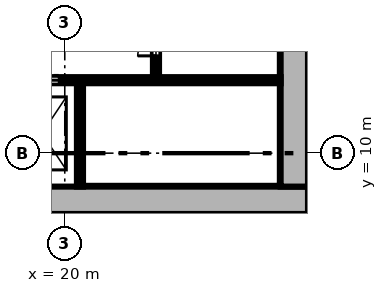
"""IFC4 building model, lengths in metres.
Left out: names, types, materials, properties, quantities, classifications, styles, units other than length and angle.
Written with IfcOpenShell. Run it as: python <this file> out.ifc"""

import sys

from ifc_helpers import new_model, si_unit, direction, frame, frame_2d, origin, place, context, subcontext, project, spatial, rectangle, extrude, element, fill, save


model = new_model("IFC4")
c1 = context("Model", 3, precision=1e-05, world=origin(), true_north=direction((0.0, 1.0)))
c2 = subcontext(c1, "Body", "Model", "MODEL_VIEW")
j1 = project(units=[si_unit("LENGTHUNIT", "METRE"), si_unit("PLANEANGLEUNIT", "RADIAN")], contexts=[c1])
p1 = place(None, origin())
s1 = spatial("IfcSite", under=j1, at=p1, CompositionType="ELEMENT")
p2 = place(p1, origin())
s2 = spatial("IfcBuilding", under=s1, at=p2, CompositionType="ELEMENT")
p3 = place(p2, origin())
s3 = spatial("IfcBuildingStorey", under=s2, at=p3, CompositionType="ELEMENT", Elevation=0.0)
p4 = place(p3, frame((8.0, 8.45, 0.0), z_axis=(0.0, 0.0, 1.0), x_axis=(1.0, 0.0, 0.0)))
e1 = element("IfcWall", 1, at=p4, inside=s3, PredefinedType="SHEAR", context=c2, shape_type="SweptSolid", body=[
    extrude(rectangle(XDim=20.0, YDim=0.9, at=frame_2d((10.0, 0.0))), origin(), (0.0, 0.0, 1.0), 6.0),
])
p5 = place(p3, frame((27.55, 8.9, 0.0), z_axis=(0.0, 0.0, 1.0), x_axis=(0.0, 1.0, 0.0)))
e2 = element("IfcWall", 2, at=p5, inside=s3, PredefinedType="SHEAR", context=c2, shape_type="SweptSolid", body=[
    extrude(rectangle(XDim=18.2, YDim=0.9, at=frame_2d((9.1, 0.0))), origin(), (0.0, 0.0, 1.0), 6.0),
])
p6 = place(p5, frame((4.55, 0.0, 0.0)))
e3 = element("IfcOpeningElement", 3, at=p6, cuts=e2, PredefinedType="OPENING", context=c2, shape_type="SweptSolid", body=[
    extrude(rectangle(XDim=1.6, YDim=2.1, at=frame_2d((0.8, 1.05))), frame((0.0, 0.46, 0.0), z_axis=(0.0, -1.0, 0.0), x_axis=(1.0, 0.0, 0.0)), (0.0, 0.0, 1.0), 0.92),
])
p7 = place(p3, frame((13.8, 12.4, 0.0), z_axis=(0.0, 0.0, 1.0), x_axis=(1.0, 0.0, 0.0)))
e4 = element("IfcWall", 4, at=p7, inside=s3, PredefinedType="SHEAR", context=c2, shape_type="SweptSolid", body=[
    extrude(rectangle(XDim=13.3, YDim=0.2, at=frame_2d((6.65, 0.0))), origin(), (0.0, 0.0, 1.0), 5.55),
])
p8 = place(p7, frame((2.4, 0.0, 0.0)))
e5 = element("IfcOpeningElement", 5, at=p8, cuts=e4, PredefinedType="OPENING", context=c2, shape_type="SweptSolid", body=[
    extrude(rectangle(XDim=1.1, YDim=2.1, at=frame_2d((0.55, 1.05))), frame((0.0, 0.11, 0.0), z_axis=(0.0, -1.0, 0.0), x_axis=(1.0, 0.0, 0.0)), (0.0, 0.0, 1.0), 0.22),
])
p9 = place(p7, frame((4.9, 0.0, 0.0)))
e6 = element("IfcOpeningElement", 6, at=p9, cuts=e4, PredefinedType="OPENING", context=c2, shape_type="SweptSolid", body=[
    extrude(rectangle(XDim=1.1, YDim=2.1, at=frame_2d((0.55, 1.05))), frame((0.0, 0.11, 0.0), z_axis=(0.0, -1.0, 0.0), x_axis=(1.0, 0.0, 0.0)), (0.0, 0.0, 1.0), 0.22),
])
p10 = place(p7, frame((0.25, 0.0, 0.0)))
e7 = element("IfcOpeningElement", 7, at=p10, cuts=e4, PredefinedType="OPENING", context=c2, shape_type="SweptSolid", body=[
    extrude(rectangle(XDim=1.0, YDim=2.1, at=frame_2d((0.5, 1.05))), frame((0.0, 0.11, 0.0), z_axis=(0.0, -1.0, 0.0), x_axis=(1.0, 0.0, 0.0)), (0.0, 0.0, 1.0), 0.22),
])
p11 = place(p3, frame((20.5, 8.9, 0.0), z_axis=(0.0, 0.0, 1.0), x_axis=(0.0, 1.0, 0.0)))
e8 = element("IfcWall", 8, at=p11, inside=s3, PredefinedType="SHEAR", context=c2, shape_type="SweptSolid", body=[
    extrude(rectangle(XDim=3.5, YDim=0.2, at=frame_2d((1.75, 0.0))), origin(), (0.0, 0.0, 1.0), 5.55),
])
p12 = place(p3, frame((23.0, 12.4, 0.0), z_axis=(0.0, 0.0, 1.0), x_axis=(0.0, 1.0, 0.0)))
e9 = element("IfcWall", 9, at=p12, inside=s3, PredefinedType="SHEAR", context=c2, shape_type="SweptSolid", body=[
    extrude(rectangle(XDim=2.8, YDim=0.2, at=frame_2d((1.4, 0.0))), origin(), (0.0, 0.0, 1.0), 5.55),
])
p13 = place(p12, frame((0.8, 0.0, 0.0)))
e10 = element("IfcOpeningElement", 10, at=p13, cuts=e9, PredefinedType="OPENING", context=c2, shape_type="SweptSolid", body=[
    extrude(rectangle(XDim=1.2, YDim=2.1, at=frame_2d((0.6, 1.05))), frame((0.0, 0.11, 0.0), z_axis=(0.0, -1.0, 0.0), x_axis=(1.0, 0.0, 0.0)), (0.0, 0.0, 1.0), 0.22),
])
p14 = place(p9, origin())
e11 = element("IfcDoor", 11, at=p14, inside=s3, OperationType="DOUBLE_DOOR_SLIDING", PredefinedType="DOOR", context=c2, shape_type="SweptSolid", body=[
    extrude(rectangle(XDim=1.1, YDim=2.1, at=frame_2d((0.55, 1.05))), frame((0.0, 0.025, 0.0), z_axis=(0.0, -1.0, 0.0), x_axis=(1.0, 0.0, 0.0)), (0.0, 0.0, 1.0), 0.05),
])
fill(e6, e11)
p15 = place(p13, origin())
e12 = element("IfcDoor", 12, at=p15, inside=s3, OperationType="DOUBLE_DOOR_SINGLE_SWING", PredefinedType="DOOR", context=c2, shape_type="SweptSolid", body=[
    extrude(rectangle(XDim=1.2, YDim=2.1, at=frame_2d((0.6, 1.05))), frame((0.0, 0.025, 0.0), z_axis=(0.0, -1.0, 0.0), x_axis=(1.0, 0.0, 0.0)), (0.0, 0.0, 1.0), 0.05),
])
fill(e10, e12)
save(model, sys.argv[1])
